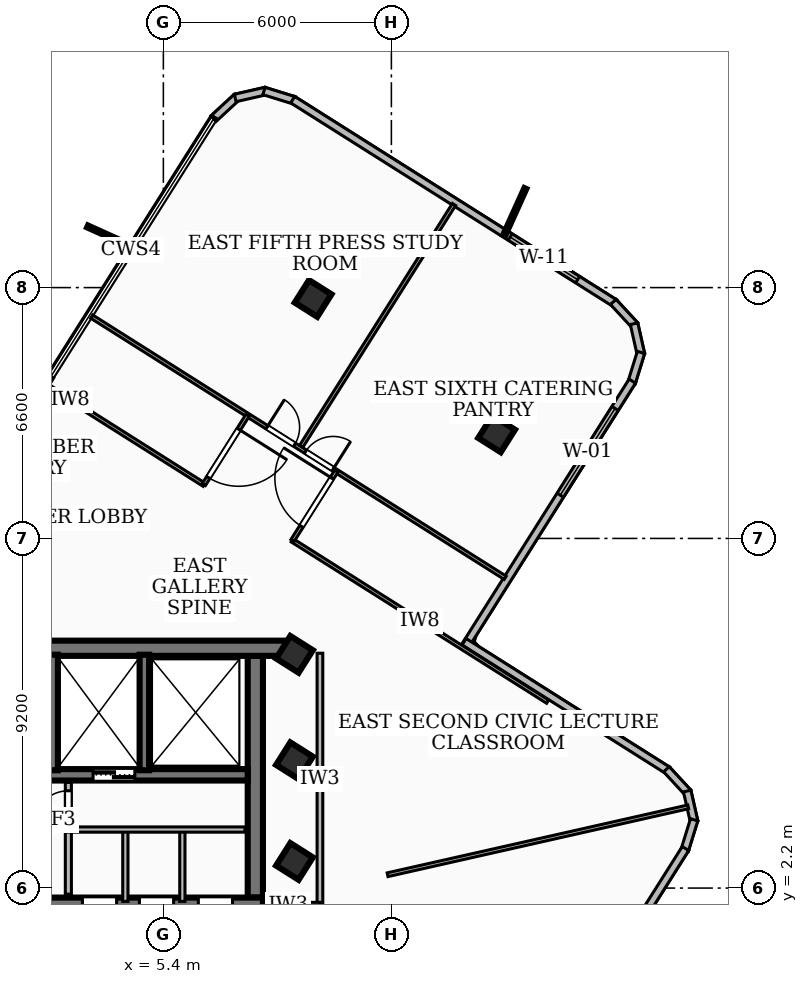
"""IFC4 building model, lengths in metres.
Left out: names, types, materials, properties, quantities, classifications, styles, units other than length and angle.
Written with IfcOpenShell. Run it as: python <this file> out.ifc"""

import sys

from ifc_helpers import new_model, si_unit, direction, frame, frame_2d, origin, origin_2d, place, context, subcontext, project, spatial, rectangle, extrude, element, fill, save


model = new_model("IFC4")
c1 = context("Model", 3, precision=1e-05, world=origin(), true_north=direction((0.0, 1.0)))
c2 = subcontext(c1, "Body", "Model", "MODEL_VIEW")
j1 = project(units=[si_unit("LENGTHUNIT", "METRE"), si_unit("PLANEANGLEUNIT", "RADIAN")], contexts=[c1])
p1 = place(None, origin())
s1 = spatial("IfcSite", under=j1, at=p1, CompositionType="ELEMENT")
p2 = place(p1, origin())
s2 = spatial("IfcBuilding", under=s1, at=p2, CompositionType="ELEMENT")
p3 = place(p2, frame((0.0, 0.0, 274.86)))
s3 = spatial("IfcBuildingStorey", under=s2, at=p3, CompositionType="ELEMENT", Elevation=274.86)
p4 = place(p3, frame((-8.78, 8.51, 0.0), z_axis=(0.0, 0.0, 1.0), x_axis=(1.0, 0.0, 0.0)))
e1 = element("IfcWall", 1, at=p4, inside=s3, PredefinedType="SHEAR", context=c2, shape_type="SweptSolid", body=[
    extrude(rectangle(XDim=17.56, YDim=0.4, at=frame_2d((8.78, 0.0))), origin(), (0.0, 0.0, 1.0), 3.16),
])
p5 = place(p3, frame((8.02, 1.75, 0.0), z_axis=(0.0, 0.0, 1.0), x_axis=(-1.0, 0.0, 0.0)))
e2 = element("IfcWall", 2, at=p5, inside=s3, PredefinedType="SHEAR", context=c2, shape_type="SweptSolid", body=[
    extrude(rectangle(XDim=16.04, YDim=0.4, at=frame_2d((8.02, 0.0))), origin(), (0.0, 0.0, 1.0), 3.16),
])
p6 = place(p5, frame((7.45, 0.0, 0.0)))
e3 = element("IfcOpeningElement", 3, at=p6, cuts=e2, PredefinedType="OPENING", context=c2, shape_type="SweptSolid", body=[
    extrude(rectangle(XDim=1.0, YDim=2.1, at=frame_2d((0.5, 1.05))), frame((0.0, 0.21, 0.0), z_axis=(0.0, -1.0, 0.0), x_axis=(1.0, 0.0, 0.0)), (0.0, 0.0, 1.0), 0.42),
])
p7 = place(p5, frame((14.285, 0.0, 0.0)))
e4 = element("IfcOpeningElement", 4, at=p7, cuts=e2, PredefinedType="OPENING", context=c2, shape_type="SweptSolid", body=[
    extrude(rectangle(XDim=1.05, YDim=2.15, at=frame_2d((0.525, 1.075))), frame((0.0, 0.21, 0.0), z_axis=(0.0, -1.0, 0.0), x_axis=(1.0, 0.0, 0.0)), (0.0, 0.0, 1.0), 0.42),
])
p8 = place(p5, frame((12.725, 0.0, 0.0)))
e5 = element("IfcOpeningElement", 5, at=p8, cuts=e2, PredefinedType="OPENING", context=c2, shape_type="SweptSolid", body=[
    extrude(rectangle(XDim=1.05, YDim=2.15, at=frame_2d((0.525, 1.075))), frame((0.0, 0.21, 0.0), z_axis=(0.0, -1.0, 0.0), x_axis=(1.0, 0.0, 0.0)), (0.0, 0.0, 1.0), 0.42),
])
p9 = place(p5, frame((11.165, 0.0, 0.0)))
e6 = element("IfcOpeningElement", 6, at=p9, cuts=e2, PredefinedType="OPENING", context=c2, shape_type="SweptSolid", body=[
    extrude(rectangle(XDim=1.05, YDim=2.15, at=frame_2d((0.525, 1.075))), frame((0.0, 0.21, 0.0), z_axis=(0.0, -1.0, 0.0), x_axis=(1.0, 0.0, 0.0)), (0.0, 0.0, 1.0), 0.42),
])
p10 = place(p5, frame((3.85, 0.0, 0.0)))
e7 = element("IfcOpeningElement", 7, at=p10, cuts=e2, PredefinedType="OPENING", context=c2, shape_type="SweptSolid", body=[
    extrude(rectangle(XDim=0.9, YDim=2.06, at=frame_2d((0.45, 1.03))), frame((0.0, 0.21, 0.0), z_axis=(0.0, -1.0, 0.0), x_axis=(1.0, 0.0, 0.0)), (0.0, 0.0, 1.0), 0.42),
])
p11 = place(p5, frame((2.35, 0.0, 0.0)))
e8 = element("IfcOpeningElement", 8, at=p11, cuts=e2, PredefinedType="OPENING", context=c2, shape_type="SweptSolid", body=[
    extrude(rectangle(XDim=0.9, YDim=2.06, at=frame_2d((0.45, 1.03))), frame((0.0, 0.21, 0.0), z_axis=(0.0, -1.0, 0.0), x_axis=(1.0, 0.0, 0.0)), (0.0, 0.0, 1.0), 0.42),
])
p12 = place(p5, frame((0.8, 0.0, 0.0)))
e9 = element("IfcOpeningElement", 9, at=p12, cuts=e2, PredefinedType="OPENING", context=c2, shape_type="SweptSolid", body=[
    extrude(rectangle(XDim=0.9, YDim=2.06, at=frame_2d((0.45, 1.03))), frame((0.0, 0.21, 0.0), z_axis=(0.0, -1.0, 0.0), x_axis=(1.0, 0.0, 0.0)), (0.0, 0.0, 1.0), 0.42),
])
p13 = place(p3, frame((7.82, 8.31, 0.0), z_axis=(0.0, 0.0, 1.0), x_axis=(0.0, -1.0, 0.0)))
e10 = element("IfcWall", 10, at=p13, inside=s3, PredefinedType="SHEAR", context=c2, shape_type="SweptSolid", body=[
    extrude(rectangle(XDim=6.36, YDim=0.4, at=frame_2d((3.18, 0.0))), origin(), (0.0, 0.0, 1.0), 3.16),
])
p14 = place(p3, frame((7.62, 5.18, 0.0), z_axis=(0.0, 0.0, 1.0), x_axis=(-1.0, 0.0, 0.0)))
e11 = element("IfcWall", 11, at=p14, inside=s3, PredefinedType="SOLIDWALL", context=c2, shape_type="SweptSolid", body=[
    extrude(rectangle(XDim=15.24, YDim=0.3, at=frame_2d((7.62, 0.0))), origin(), (0.0, 0.0, 1.0), 3.16),
])
p15 = place(p14, frame((5.77, 0.0, 0.0)))
e12 = element("IfcOpeningElement", 12, at=p15, cuts=e11, PredefinedType="OPENING", context=c2, shape_type="SweptSolid", body=[
    extrude(rectangle(XDim=1.1, YDim=2.15, at=frame_2d((0.55, 1.075))), frame((0.0, 0.16, 0.0), z_axis=(0.0, -1.0, 0.0), x_axis=(1.0, 0.0, 0.0)), (0.0, 0.0, 1.0), 0.32),
])
p16 = place(p14, frame((2.97, 0.0, 0.0)))
e13 = element("IfcOpeningElement", 13, at=p16, cuts=e11, PredefinedType="OPENING", context=c2, shape_type="SweptSolid", body=[
    extrude(rectangle(XDim=1.1, YDim=2.15, at=frame_2d((0.55, 1.075))), frame((0.0, 0.16, 0.0), z_axis=(0.0, -1.0, 0.0), x_axis=(1.0, 0.0, 0.0)), (0.0, 0.0, 1.0), 0.32),
])
p17 = place(p14, frame((7.97, 0.0, 0.0)))
e14 = element("IfcOpeningElement", 14, at=p17, cuts=e11, PredefinedType="OPENING", context=c2, shape_type="SweptSolid", body=[
    extrude(rectangle(XDim=1.0, YDim=2.1, at=frame_2d((0.5, 1.05))), frame((0.0, 0.16, 0.0), z_axis=(0.0, -1.0, 0.0), x_axis=(1.0, 0.0, 0.0)), (0.0, 0.0, 1.0), 0.32),
])
for number, where, z_axis, x_axis in (
    (15, (2.5, 5.3, 0.0), (0.0, 0.0, 1.0), (0.0, 1.0, 0.0)),
    (16, (4.9, 5.3, 0.0), (0.0, 0.0, 1.0), (0.0, 1.0, 0.0)),
):
    element("IfcWall", number, at=place(p3, frame(where, z_axis=z_axis, x_axis=x_axis)), inside=s3, PredefinedType="SOLIDWALL", context=c2, shape_type="SweptSolid", body=[
        extrude(rectangle(XDim=3.04, YDim=0.25, at=frame_2d((1.52, 0.0))), origin(), (0.0, 0.0, 1.0), 3.16),
    ])
for number, where, z_axis, x_axis in (
    (17, (8.85, 2.9, 0.0), (0.0, 0.0, 1.0), (0.534, 0.845, 0.0)),
    (18, (8.85, 5.55, 0.0), (0.0, 0.0, 1.0), (0.534, 0.845, 0.0)),
    (19, (8.85, 8.35, 0.0), (0.0, 0.0, 1.0), (0.534, 0.845, 0.0)),
    (20, (14.169, 14.152, 0.0), (0.0, 0.0, 1.0), (0.534, 0.845, 0.0)),
    (21, (9.341, 17.714, 0.0), (0.0, 0.0, 1.0), (0.534, 0.845, 0.0)),
):
    element("IfcColumn", number, at=place(p3, frame(where, z_axis=z_axis, x_axis=x_axis)), inside=s3, PredefinedType="COLUMN", context=c2, shape_type="SweptSolid", body=[
        extrude(rectangle(XDim=0.7, YDim=0.7, at=origin_2d()), origin(), (0.0, 0.0, 1.0), 3.42),
    ])
p18 = place(p3, frame((-3.241, 19.139, 0.0), z_axis=(0.0, 0.0, 1.0), x_axis=(0.845431246435, -0.534084270085, 0.0)))
e22 = element("IfcWall", 22, at=p18, inside=s3, PredefinedType="SOLIDWALL", context=c2, shape_type="SweptSolid", body=[
    extrude(rectangle(XDim=6.742, YDim=0.2, at=frame_2d((3.371, 0.0))), origin(), (0.0, 0.0, 1.0), 3.16),
])
p19 = place(p3, frame((6.718, 22.444, 0.0), z_axis=(0.0, 0.0, 1.0), x_axis=(0.7346916161, 0.67840123027, 0.0)))
e23 = element("IfcWall", 23, at=p19, inside=s3, PredefinedType="SOLIDWALL", context=c2, shape_type="SweptSolid", body=[
    extrude(rectangle(XDim=0.837, YDim=0.2, at=frame_2d((0.418, 0.0))), origin(), (0.0, 0.0, 1.0), 3.16),
])
p20 = place(p3, frame((7.291, 22.989, 0.0), z_axis=(0.0, 0.0, 1.0), x_axis=(0.975030953114, 0.222068999343, 0.0)))
e24 = element("IfcWall", 24, at=p20, inside=s3, PredefinedType="SOLIDWALL", context=c2, shape_type="SweptSolid", body=[
    extrude(rectangle(XDim=0.824, YDim=0.2, at=frame_2d((0.412, 0.0))), origin(), (0.0, 0.0, 1.0), 3.16),
])
p21 = place(p3, frame((8.047, 23.173, 0.0), z_axis=(0.0, 0.0, 1.0), x_axis=(0.955223194498, -0.295886209027, 0.0)))
e25 = element("IfcWall", 25, at=p21, inside=s3, PredefinedType="SOLIDWALL", context=c2, shape_type="SweptSolid", body=[
    extrude(rectangle(XDim=0.838, YDim=0.2, at=frame_2d((0.419, 0.0))), origin(), (0.0, 0.0, 1.0), 3.16),
])
p22 = place(p3, frame((8.803, 22.945, 0.0), z_axis=(0.0, 0.0, 1.0), x_axis=(0.845446069837, -0.534060804588, 0.0)))
e26 = element("IfcWall", 26, at=p22, inside=s3, PredefinedType="SOLIDWALL", context=c2, shape_type="SweptSolid", body=[
    extrude(rectangle(XDim=10.023, YDim=0.2, at=frame_2d((5.012, 0.0))), origin(), (0.0, 0.0, 1.0), 3.16),
])
p23 = place(p22, frame((6.768, 0.0, 0.85)))
e27 = element("IfcOpeningElement", 27, at=p23, cuts=e26, PredefinedType="OPENING", context=c2, shape_type="SweptSolid", body=[
    extrude(rectangle(XDim=2.1, YDim=1.6, at=frame_2d((1.05, 0.8))), frame((0.0, 0.11, 0.0), z_axis=(0.0, -1.0, 0.0), x_axis=(1.0, 0.0, 0.0)), (0.0, 0.0, 1.0), 0.22),
])
p24 = place(p3, frame((17.239, 17.623, 0.0), z_axis=(0.0, 0.0, 1.0), x_axis=(0.679187212508, -0.73396507435, 0.0)))
e28 = element("IfcWall", 28, at=p24, inside=s3, PredefinedType="SOLIDWALL", context=c2, shape_type="SweptSolid", body=[
    extrude(rectangle(XDim=0.838, YDim=0.2, at=frame_2d((0.419, 0.0))), origin(), (0.0, 0.0, 1.0), 3.16),
])
p25 = place(p3, frame((17.786, 17.05, 0.0), z_axis=(0.0, 0.0, 1.0), x_axis=(0.21868713362, -0.975795028471, 0.0)))
e29 = element("IfcWall", 29, at=p25, inside=s3, PredefinedType="SOLIDWALL", context=c2, shape_type="SweptSolid", body=[
    extrude(rectangle(XDim=0.824, YDim=0.2, at=frame_2d((0.412, 0.0))), origin(), (0.0, 0.0, 1.0), 3.16),
])
p26 = place(p3, frame((17.968, 16.294, 0.0), z_axis=(0.0, 0.0, 1.0), x_axis=(-0.296133339917, -0.95514660916, 0.0)))
e30 = element("IfcWall", 30, at=p26, inside=s3, PredefinedType="SOLIDWALL", context=c2, shape_type="SweptSolid", body=[
    extrude(rectangle(XDim=0.838, YDim=0.2, at=frame_2d((0.419, 0.0))), origin(), (0.0, 0.0, 1.0), 3.16),
])
p27 = place(p3, frame((17.74, 15.539, 0.0), z_axis=(0.0, 0.0, 1.0), x_axis=(-0.533941726163, -0.845521278893, 0.0)))
e31 = element("IfcWall", 31, at=p27, inside=s3, PredefinedType="SOLIDWALL", context=c2, shape_type="SweptSolid", body=[
    extrude(rectangle(XDim=8.242, YDim=0.2, at=frame_2d((4.121, 0.0))), origin(), (0.0, 0.0, 1.0), 3.16),
])
p28 = place(p27, frame((0.85, 0.0, 0.85)))
e32 = element("IfcOpeningElement", 32, at=p28, cuts=e31, PredefinedType="OPENING", context=c2, shape_type="SweptSolid", body=[
    extrude(rectangle(XDim=2.7, YDim=2.1, at=frame_2d((1.35, 1.05))), frame((0.0, 0.11, 0.0), z_axis=(0.0, -1.0, 0.0), x_axis=(1.0, 0.0, 0.0)), (0.0, 0.0, 1.0), 0.22),
])
p29 = place(p3, frame((13.314, 8.681, 0.0), z_axis=(0.0, 0.0, 1.0), x_axis=(0.845530066623, -0.533927810135, 0.0)))
e33 = element("IfcWall", 33, at=p29, inside=s3, PredefinedType="SOLIDWALL", context=c2, shape_type="SweptSolid", body=[
    extrude(rectangle(XDim=6.342, YDim=0.2, at=frame_2d((3.171, 0.0))), origin(), (0.0, 0.0, 1.0), 3.16),
])
p30 = place(p3, frame((18.638, 5.326, 0.0), z_axis=(0.0, 0.0, 1.0), x_axis=(0.678558613405, -0.734546260064, 0.0)))
e34 = element("IfcWall", 34, at=p30, inside=s3, PredefinedType="SOLIDWALL", context=c2, shape_type="SweptSolid", body=[
    extrude(rectangle(XDim=0.837, YDim=0.2, at=frame_2d((0.418, 0.0))), origin(), (0.0, 0.0, 1.0), 3.16),
])
p31 = place(p3, frame((19.183, 4.753, 0.0), z_axis=(0.0, 0.0, 1.0), x_axis=(0.22178748126, -0.975095027757, 0.0)))
e35 = element("IfcWall", 35, at=p31, inside=s3, PredefinedType="SOLIDWALL", context=c2, shape_type="SweptSolid", body=[
    extrude(rectangle(XDim=0.824, YDim=0.2, at=frame_2d((0.412, 0.0))), origin(), (0.0, 0.0, 1.0), 3.16),
])
p32 = place(p3, frame((19.367, 3.997, 0.0), z_axis=(0.0, 0.0, 1.0), x_axis=(-0.295803919306, -0.955248680357, 0.0)))
e36 = element("IfcWall", 36, at=p32, inside=s3, PredefinedType="SOLIDWALL", context=c2, shape_type="SweptSolid", body=[
    extrude(rectangle(XDim=0.839, YDim=0.2, at=frame_2d((0.419, 0.0))), origin(), (0.0, 0.0, 1.0), 3.16),
])
p33 = place(p3, frame((19.139, 3.241, 0.0), z_axis=(0.0, 0.0, 1.0), x_axis=(-0.534084270085, -0.845431246435, 0.0)))
e37 = element("IfcWall", 37, at=p33, inside=s3, PredefinedType="SOLIDWALL", context=c2, shape_type="SweptSolid", body=[
    extrude(rectangle(XDim=6.742, YDim=0.2, at=frame_2d((3.371, 0.0))), origin(), (0.0, 0.0, 1.0), 3.16),
])
p34 = place(p3, frame((2.9, 2.04, 0.0), z_axis=(0.0, 0.0, 1.0), x_axis=(0.0, 1.0, 0.0)))
e38 = element("IfcWall", 38, at=p34, inside=s3, PredefinedType="PARTITIONING", context=c2, shape_type="SweptSolid", body=[
    extrude(rectangle(XDim=2.94, YDim=0.16, at=frame_2d((1.47, 0.0))), origin(), (0.0, 0.0, 1.0), 2.39),
])
p35 = place(p34, frame((1.82, 0.0, 0.0)))
e39 = element("IfcOpeningElement", 39, at=p35, cuts=e38, PredefinedType="OPENING", context=c2, shape_type="SweptSolid", body=[
    extrude(rectangle(XDim=0.9, YDim=2.06, at=frame_2d((0.45, 1.03))), frame((0.0, 0.09, 0.0), z_axis=(0.0, -1.0, 0.0), x_axis=(1.0, 0.0, 0.0)), (0.0, 0.0, 1.0), 0.18),
])
p36 = place(p3, frame((2.9, 3.74, 0.0), z_axis=(0.0, 0.0, 1.0), x_axis=(1.0, 0.0, 0.0)))
e40 = element("IfcWall", 40, at=p36, inside=s3, PredefinedType="PARTITIONING", context=c2, shape_type="SweptSolid", body=[
    extrude(rectangle(XDim=4.65, YDim=0.138, at=frame_2d((2.325, 0.0))), origin(), (0.0, 0.0, 1.0), 3.16),
])
for number, where, z_axis, x_axis in (
    (41, (4.4, 1.85, 0.0), (0.0, 0.0, 1.0), (0.0, 1.0, 0.0)),
    (42, (5.9, 1.85, 0.0), (0.0, 0.0, 1.0), (0.0, 1.0, 0.0)),
):
    element("IfcWall", number, at=place(p3, frame(where, z_axis=z_axis, x_axis=x_axis)), inside=s3, PredefinedType="PARTITIONING", context=c2, shape_type="SweptSolid", body=[
        extrude(rectangle(XDim=1.89, YDim=0.138, at=frame_2d((0.945, 0.0))), origin(), (0.0, 0.0, 1.0), 2.39),
    ])
p37 = place(p3, frame((9.52, 1.75, 0.0), z_axis=(0.0, 0.0, 1.0), x_axis=(0.0, 1.0, 0.0)))
e43 = element("IfcWall", 43, at=p37, inside=s3, PredefinedType="PARTITIONING", context=c2, shape_type="SweptSolid", body=[
    extrude(rectangle(XDim=6.63, YDim=0.15, at=frame_2d((3.315, 0.0))), origin(), (0.0, 0.0, 1.0), 3.16),
])
p38 = place(p3, frame((7.85, 1.75, 0.0), z_axis=(0.0, 0.0, 1.0), x_axis=(1.0, 0.0, 0.0)))
e44 = element("IfcWall", 44, at=p38, inside=s3, PredefinedType="PARTITIONING", context=c2, shape_type="SweptSolid", body=[
    extrude(rectangle(XDim=1.67, YDim=0.15, at=frame_2d((0.835, 0.0))), origin(), (0.0, 0.0, 1.0), 2.39),
])
p39 = place(p3, frame((11.3, 2.551, 0.0), z_axis=(0.0, 0.0, 1.0), x_axis=(0.975452684537, 0.220209128395, 0.0)))
e45 = element("IfcWall", 45, at=p39, inside=s3, PredefinedType="PARTITIONING", context=c2, shape_type="SweptSolid", body=[
    extrude(rectangle(XDim=8.11, YDim=0.1, at=frame_2d((4.055, 0.0))), origin(), (0.0, 0.0, 1.0), 3.16),
])
p40 = place(p3, frame((6.473, 12.813, 0.0), z_axis=(0.0, 0.0, 1.0), x_axis=(-0.845447210208, 0.534058999317, 0.0)))
e46 = element("IfcWall", 46, at=p40, inside=s3, PredefinedType="PARTITIONING", context=c2, shape_type="SweptSolid", body=[
    extrude(rectangle(XDim=8.349, YDim=0.1, at=frame_2d((4.175, 0.0))), origin(), (0.0, 0.0, 1.0), 3.16),
])
p41 = place(p3, frame((15.512, 7.104, 0.0), z_axis=(0.0, 0.0, 1.0), x_axis=(-0.845450958208, 0.534053065963, 0.0)))
e47 = element("IfcWall", 47, at=p41, inside=s3, PredefinedType="PARTITIONING", context=c2, shape_type="SweptSolid", body=[
    extrude(rectangle(XDim=7.951, YDim=0.1, at=frame_2d((3.975, 0.0))), origin(), (0.0, 0.0, 1.0), 2.53),
])
p42 = place(p3, frame((7.619, 14.645, 0.0), z_axis=(0.0, 0.0, 1.0), x_axis=(-0.533984489243, -0.845494272747, 0.0)))
e48 = element("IfcWall", 48, at=p42, inside=s3, PredefinedType="PARTITIONING", context=c2, shape_type="SweptSolid", body=[
    extrude(rectangle(XDim=2.161, YDim=0.1, at=frame_2d((1.08, 0.0))), origin(), (0.0, 0.0, 1.0), 3.16),
])
p43 = place(p42, frame((0.441, 0.0, 0.0)))
e49 = element("IfcOpeningElement", 49, at=p43, cuts=e48, PredefinedType="OPENING", context=c2, shape_type="SweptSolid", body=[
    extrude(rectangle(XDim=1.5, YDim=2.12, at=frame_2d((0.75, 1.06))), frame((0.0, 0.06, 0.0), z_axis=(0.0, -1.0, 0.0), x_axis=(1.0, 0.0, 0.0)), (0.0, 0.0, 1.0), 0.12),
])
p44 = place(p3, frame((8.798, 11.344, 0.0), z_axis=(0.0, 0.0, 1.0), x_axis=(0.533984489243, 0.845494272747, 0.0)))
e50 = element("IfcWall", 50, at=p44, inside=s3, PredefinedType="PARTITIONING", context=c2, shape_type="SweptSolid", body=[
    extrude(rectangle(XDim=2.161, YDim=0.1, at=frame_2d((1.08, 0.0))), origin(), (0.0, 0.0, 1.0), 2.53),
])
p45 = place(p44, frame((0.441, 0.0, 0.0)))
e51 = element("IfcOpeningElement", 51, at=p45, cuts=e50, PredefinedType="OPENING", context=c2, shape_type="SweptSolid", body=[
    extrude(rectangle(XDim=1.5, YDim=2.12, at=frame_2d((0.75, 1.06))), frame((0.0, 0.06, 0.0), z_axis=(0.0, -1.0, 0.0), x_axis=(1.0, 0.0, 0.0)), (0.0, 0.0, 1.0), 0.12),
])
p46 = place(p3, frame((9.029, 13.825, 0.0), z_axis=(0.0, 0.0, 1.0), x_axis=(0.534078432884, 0.845434933941, 0.0)))
e52 = element("IfcWall", 52, at=p46, inside=s3, PredefinedType="PARTITIONING", context=c2, shape_type="SweptSolid", body=[
    extrude(rectangle(XDim=7.525, YDim=0.1, at=frame_2d((3.763, 0.0))), origin(), (0.0, 0.0, 1.0), 2.53),
])
p47 = place(p3, frame((3.514, 17.237, 0.0), z_axis=(0.0, 0.0, 1.0), x_axis=(0.845461855996, -0.534035813458, 0.0)))
e53 = element("IfcWall", 53, at=p47, inside=s3, PredefinedType="PARTITIONING", context=c2, shape_type="SweptSolid", body=[
    extrude(rectangle(XDim=12.87, YDim=0.1, at=frame_2d((6.435, 0.0))), origin(), (0.0, 0.0, 1.0), 2.53),
])
p48 = place(p47, frame((6.655, 0.0, 0.0)))
e54 = element("IfcOpeningElement", 54, at=p48, cuts=e53, PredefinedType="OPENING", context=c2, shape_type="SweptSolid", body=[
    extrude(rectangle(XDim=0.86, YDim=2.04, at=frame_2d((0.43, 1.02))), frame((0.0, 0.06, 0.0), z_axis=(0.0, -1.0, 0.0), x_axis=(1.0, 0.0, 0.0)), (0.0, 0.0, 1.0), 0.12),
])
p49 = place(p47, frame((5.454, 0.0, 0.0)))
e55 = element("IfcOpeningElement", 55, at=p49, cuts=e53, PredefinedType="OPENING", context=c2, shape_type="SweptSolid", body=[
    extrude(rectangle(XDim=0.86, YDim=2.04, at=frame_2d((0.43, 1.02))), frame((0.0, 0.06, 0.0), z_axis=(0.0, -1.0, 0.0), x_axis=(1.0, 0.0, 0.0)), (0.0, 0.0, 1.0), 0.12),
])
p50 = place(p23, origin())
e56 = element("IfcWindow", 56, at=p50, inside=s3, PartitioningType="SINGLE_PANEL", PredefinedType="WINDOW", context=c2, shape_type="SweptSolid", body=[
    extrude(rectangle(XDim=2.1, YDim=1.6, at=frame_2d((1.05, 0.8))), frame((0.0, 0.03, 0.0), z_axis=(0.0, -1.0, 0.0), x_axis=(1.0, 0.0, 0.0)), (0.0, 0.0, 1.0), 0.06),
])
fill(e27, e56)
p51 = place(p28, origin())
e57 = element("IfcWindow", 57, at=p51, inside=s3, PartitioningType="SINGLE_PANEL", PredefinedType="WINDOW", context=c2, shape_type="SweptSolid", body=[
    extrude(rectangle(XDim=2.7, YDim=2.1, at=frame_2d((1.35, 1.05))), frame((0.0, 0.03, 0.0), z_axis=(0.0, -1.0, 0.0), x_axis=(1.0, 0.0, 0.0)), (0.0, 0.0, 1.0), 0.06),
])
fill(e32, e57)
p52 = place(p16, origin())
e58 = element("IfcDoor", 58, at=p52, inside=s3, OperationType="DOUBLE_DOOR_SLIDING", PredefinedType="DOOR", context=c2, shape_type="SweptSolid", body=[
    extrude(rectangle(XDim=1.1, YDim=2.15, at=frame_2d((0.55, 1.075))), frame((0.0, 0.025, 0.0), z_axis=(0.0, -1.0, 0.0), x_axis=(1.0, 0.0, 0.0)), (0.0, 0.0, 1.0), 0.05),
])
fill(e13, e58)
p53 = place(p10, origin())
e59 = element("IfcDoor", 59, at=p53, inside=s3, OperationType="SINGLE_SWING_RIGHT", PredefinedType="DOOR", context=c2, shape_type="SweptSolid", body=[
    extrude(rectangle(XDim=0.9, YDim=2.06, at=frame_2d((0.45, 1.03))), frame((0.0, 0.025, 0.0), z_axis=(0.0, -1.0, 0.0), x_axis=(1.0, 0.0, 0.0)), (0.0, 0.0, 1.0), 0.05),
])
fill(e7, e59)
p54 = place(p11, origin())
e60 = element("IfcDoor", 60, at=p54, inside=s3, OperationType="SINGLE_SWING_LEFT", PredefinedType="DOOR", context=c2, shape_type="SweptSolid", body=[
    extrude(rectangle(XDim=0.9, YDim=2.06, at=frame_2d((0.45, 1.03))), frame((0.0, 0.025, 0.0), z_axis=(0.0, -1.0, 0.0), x_axis=(1.0, 0.0, 0.0)), (0.0, 0.0, 1.0), 0.05),
])
fill(e8, e60)
p55 = place(p12, origin())
e61 = element("IfcDoor", 61, at=p55, inside=s3, OperationType="SINGLE_SWING_LEFT", PredefinedType="DOOR", context=c2, shape_type="SweptSolid", body=[
    extrude(rectangle(XDim=0.9, YDim=2.06, at=frame_2d((0.45, 1.03))), frame((0.0, 0.025, 0.0), z_axis=(0.0, -1.0, 0.0), x_axis=(1.0, 0.0, 0.0)), (0.0, 0.0, 1.0), 0.05),
])
fill(e9, e61)
p56 = place(p35, origin())
e62 = element("IfcDoor", 62, at=p56, inside=s3, OperationType="SINGLE_SWING_LEFT", PredefinedType="DOOR", context=c2, shape_type="SweptSolid", body=[
    extrude(rectangle(XDim=0.9, YDim=2.06, at=frame_2d((0.45, 1.03))), frame((0.0, 0.025, 0.0), z_axis=(0.0, -1.0, 0.0), x_axis=(1.0, 0.0, 0.0)), (0.0, 0.0, 1.0), 0.05),
])
fill(e39, e62)
p57 = place(p43, origin())
e63 = element("IfcDoor", 63, at=p57, inside=s3, OperationType="SINGLE_SWING_LEFT", PredefinedType="DOOR", context=c2, shape_type="SweptSolid", body=[
    extrude(rectangle(XDim=1.5, YDim=2.12, at=frame_2d((0.75, 1.06))), frame((0.0, 0.025, 0.0), z_axis=(0.0, -1.0, 0.0), x_axis=(1.0, 0.0, 0.0)), (0.0, 0.0, 1.0), 0.05),
])
fill(e49, e63)
p58 = place(p45, origin())
e64 = element("IfcDoor", 64, at=p58, inside=s3, OperationType="SINGLE_SWING_RIGHT", PredefinedType="DOOR", context=c2, shape_type="SweptSolid", body=[
    extrude(rectangle(XDim=1.5, YDim=2.12, at=frame_2d((0.75, 1.06))), frame((0.0, 0.025, 0.0), z_axis=(0.0, -1.0, 0.0), x_axis=(1.0, 0.0, 0.0)), (0.0, 0.0, 1.0), 0.05),
])
fill(e51, e64)
p59 = place(p48, origin())
e65 = element("IfcDoor", 65, at=p59, inside=s3, OperationType="SINGLE_SWING_RIGHT", PredefinedType="DOOR", context=c2, shape_type="SweptSolid", body=[
    extrude(rectangle(XDim=0.86, YDim=2.04, at=frame_2d((0.43, 1.02))), frame((0.0, 0.025, 0.0), z_axis=(0.0, -1.0, 0.0), x_axis=(1.0, 0.0, 0.0)), (0.0, 0.0, 1.0), 0.05),
])
fill(e54, e65)
p60 = place(p49, origin())
e66 = element("IfcDoor", 66, at=p60, inside=s3, OperationType="SINGLE_SWING_LEFT", PredefinedType="DOOR", context=c2, shape_type="SweptSolid", body=[
    extrude(rectangle(XDim=0.86, YDim=2.04, at=frame_2d((0.43, 1.02))), frame((0.0, 0.025, 0.0), z_axis=(0.0, -1.0, 0.0), x_axis=(1.0, 0.0, 0.0)), (0.0, 0.0, 1.0), 0.05),
])
fill(e55, e66)
save(model, sys.argv[1])
